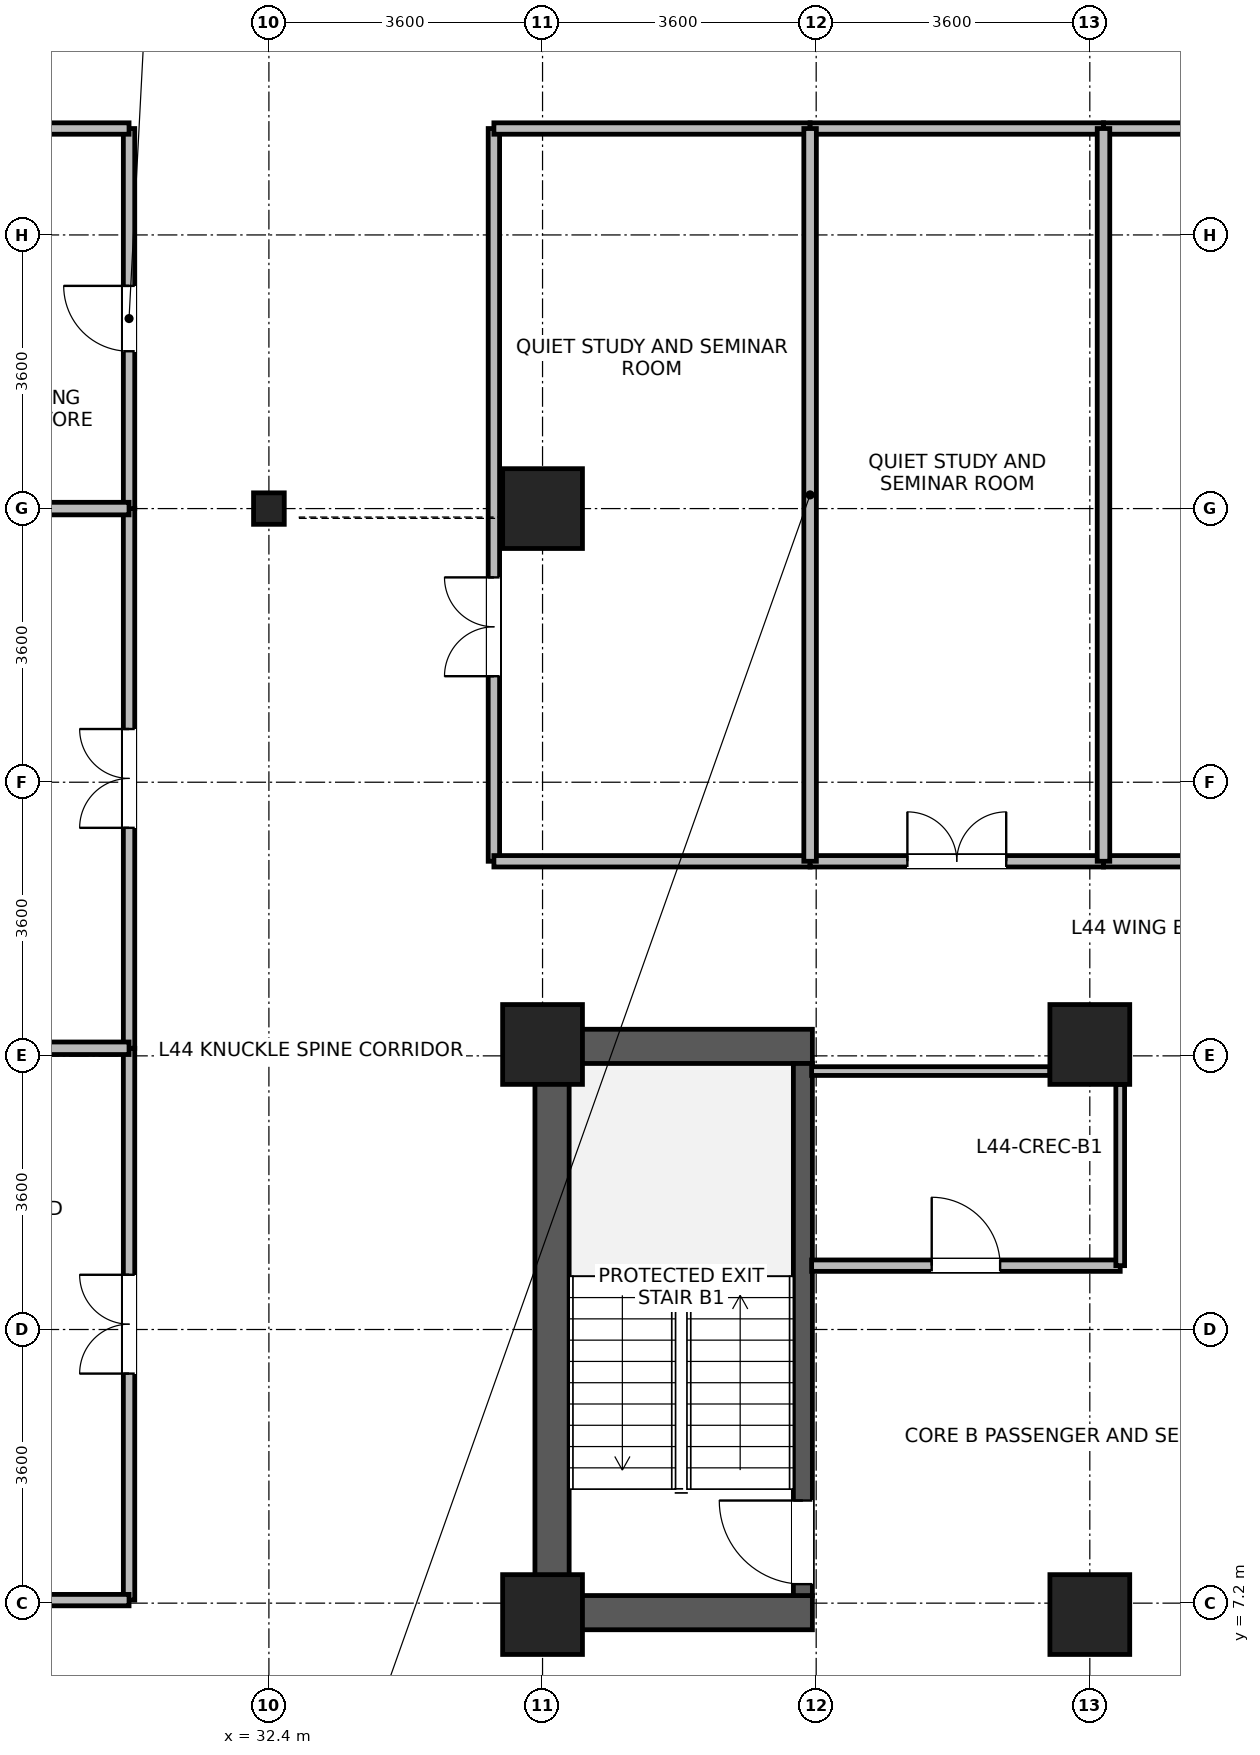
"""IFC4 building model, lengths in metres.
Left out: names, types, materials, properties, quantities, classifications, styles, units other than length and angle.
Written with IfcOpenShell. Run it as: python <this file> out.ifc"""

import sys

from ifc_helpers import new_model, si_unit, direction, frame, frame_2d, origin, origin_2d, place, context, subcontext, project, spatial, rectangle, i_section, extrude, source, transform, mapped, element, fill, save


model = new_model("IFC4")
c1 = context("Model", 3, precision=1e-05, world=origin(), true_north=direction((0.0, 1.0)))
c2 = subcontext(c1, "Body", "Model", "MODEL_VIEW")
j1 = project(units=[si_unit("LENGTHUNIT", "METRE"), si_unit("PLANEANGLEUNIT", "RADIAN")], contexts=[c1])
p1 = place(None, origin())
s1 = spatial("IfcSite", under=j1, at=p1, CompositionType="ELEMENT")
p2 = place(p1, origin())
s2 = spatial("IfcBuilding", under=s1, at=p2, CompositionType="ELEMENT")
p3 = place(p2, frame((0.0, 0.0, 173.5)))
s3 = spatial("IfcBuildingStorey", under=s2, at=p3, CompositionType="ELEMENT", Elevation=173.5)
p4 = place(p3, frame((36.125, 6.85, 0.0), z_axis=(0.0, 0.0, 1.0), x_axis=(0.0, 1.0, 0.0)))
e1 = element("IfcWall", 1, at=p4, inside=s3, PredefinedType="SHEAR", context=c2, shape_type="SweptSolid", body=[
    extrude(rectangle(XDim=7.9, YDim=0.45, at=frame_2d((3.95, 0.0))), origin(), (0.0, 0.0, 1.0), 3.46),
])
for number, where, z_axis, x_axis in (
    (2, (36.35, 7.075, 0.0), (0.0, 0.0, 1.0), (1.0, 0.0, 0.0)),
    (3, (36.35, 14.525, 0.0), (0.0, 0.0, 1.0), (1.0, 0.0, 0.0)),
):
    element("IfcWall", number, at=place(p3, frame(where, z_axis=z_axis, x_axis=x_axis)), inside=s3, PredefinedType="SHEAR", context=c2, shape_type="SweptSolid", body=[
        extrude(rectangle(XDim=3.2, YDim=0.45, at=frame_2d((1.6, 0.0))), origin(), (0.0, 0.0, 1.0), 3.46),
    ])
p5 = place(p3, frame((39.425, 7.3, 0.0), z_axis=(0.0, 0.0, 1.0), x_axis=(0.0, 1.0, 0.0)))
e4 = element("IfcWall", 4, at=p5, inside=s3, PredefinedType="SHEAR", context=c2, shape_type="SweptSolid", body=[
    extrude(rectangle(XDim=7.0, YDim=0.25, at=frame_2d((3.5, 0.0))), origin(), (0.0, 0.0, 1.0), 3.46),
])
p6 = place(p5, frame((0.15, 0.0, 0.0)))
e5 = element("IfcOpeningElement", 5, at=p6, cuts=e4, PredefinedType="OPENING", context=c2, shape_type="SweptSolid", body=[
    extrude(rectangle(XDim=1.1, YDim=2.08, at=frame_2d((0.55, 1.04))), frame((0.0, 0.135, 0.0), z_axis=(0.0, -1.0, 0.0), x_axis=(1.0, 0.0, 0.0)), (0.0, 0.0, 1.0), 0.27),
])
m1 = source(origin(), c2, "Body", "SweptSolid", [
    extrude(rectangle(XDim=1.05, YDim=1.05, at=origin_2d()), origin(), (0.0, 0.0, 1.0), 3.7),
])
for number, where, z_axis, x_axis in (
    (6, (36.0, 21.6, 0.0), (0.0, 0.0, 1.0), (1.0, 0.0, 0.0)),
    (7, (36.0, 7.05, 0.0), (0.0, 0.0, 1.0), (1.0, 0.0, 0.0)),
    (8, (36.0, 14.55, 0.0), (0.0, 0.0, 1.0), (1.0, 0.0, 0.0)),
    (9, (43.2, 7.05, 0.0), (0.0, 0.0, 1.0), (1.0, 0.0, 0.0)),
    (10, (43.2, 14.55, 0.0), (0.0, 0.0, 1.0), (1.0, 0.0, 0.0)),
):
    element("IfcColumn", number, at=place(p3, frame(where, z_axis=z_axis, x_axis=x_axis)), inside=s3, PredefinedType="COLUMN", context=c2, shape_type="MappedRepresentation", body=[
        mapped(m1, transform((0.0, 0.0, 0.0), x_axis=(1.0, 0.0, 0.0), y_axis=(0.0, 1.0, 0.0), z_axis=(0.0, 0.0, 1.0), scale=1.0)),
    ])
m2 = source(origin(), c2, "Body", "SweptSolid", [
    extrude(i_section(OverallWidth=0.404, OverallDepth=0.414, WebThickness=0.021, FlangeThickness=0.028, FilletRadius=0.015, at=origin_2d()), origin(), (0.0, 0.0, 1.0), 3.7),
])
p7 = place(p3, frame((32.4, 21.6, 0.0), z_axis=(0.0, 0.0, 1.0), x_axis=(1.0, 0.0, 0.0)))
e11 = element("IfcColumn", 11, at=p7, inside=s3, PredefinedType="COLUMN", context=c2, shape_type="MappedRepresentation", body=[
    mapped(m2, transform((0.0, 0.0, 0.0), x_axis=(1.0, 0.0, 0.0), y_axis=(0.0, 1.0, 0.0), z_axis=(0.0, 0.0, 1.0), scale=1.0)),
])
p8 = place(p3, frame((35.36, 16.96, 0.0), z_axis=(0.0, 0.0, 1.0), x_axis=(0.0, 1.0, 0.0)))
e12 = element("IfcWall", 12, at=p8, inside=s3, PredefinedType="PARTITIONING", context=c2, shape_type="SweptSolid", body=[
    extrude(rectangle(XDim=9.64, YDim=0.15, at=frame_2d((4.82, 0.0))), origin(), (0.0, 0.0, 1.0), 3.44),
])
p9 = place(p8, frame((2.435, 0.0, 0.0)))
e13 = element("IfcOpeningElement", 13, at=p9, cuts=e12, PredefinedType="OPENING", context=c2, shape_type="SweptSolid", body=[
    extrude(rectangle(XDim=1.3, YDim=2.12, at=frame_2d((0.65, 1.06))), frame((0.0, 0.085, 0.0), z_axis=(0.0, -1.0, 0.0), x_axis=(1.0, 0.0, 0.0)), (0.0, 0.0, 1.0), 0.17),
])
p10 = place(p3, frame((30.56, 7.24, 0.0), z_axis=(0.0, 0.0, 1.0), x_axis=(0.0, 1.0, 0.0)))
e14 = element("IfcWall", 14, at=p10, inside=s3, PredefinedType="PARTITIONING", context=c2, shape_type="SweptSolid", body=[
    extrude(rectangle(XDim=7.26, YDim=0.15, at=frame_2d((3.63, 0.0))), origin(), (0.0, 0.0, 1.0), 3.44),
])
p11 = place(p10, frame((2.98, 0.0, 0.0)))
e15 = element("IfcOpeningElement", 15, at=p11, cuts=e14, PredefinedType="OPENING", context=c2, shape_type="SweptSolid", body=[
    extrude(rectangle(XDim=1.3, YDim=2.12, at=frame_2d((0.65, 1.06))), frame((0.0, 0.085, 0.0), z_axis=(0.0, -1.0, 0.0), x_axis=(1.0, 0.0, 0.0)), (0.0, 0.0, 1.0), 0.17),
])
p12 = place(p3, frame((30.56, 14.5, 0.0), z_axis=(0.0, 0.0, 1.0), x_axis=(0.0, 1.0, 0.0)))
e16 = element("IfcWall", 16, at=p12, inside=s3, PredefinedType="PARTITIONING", context=c2, shape_type="SweptSolid", body=[
    extrude(rectangle(XDim=7.1, YDim=0.15, at=frame_2d((3.55, 0.0))), origin(), (0.0, 0.0, 1.0), 3.44),
])
p13 = place(p12, frame((2.9, 0.0, 0.0)))
e17 = element("IfcOpeningElement", 17, at=p13, cuts=e16, PredefinedType="OPENING", context=c2, shape_type="SweptSolid", body=[
    extrude(rectangle(XDim=1.3, YDim=2.12, at=frame_2d((0.65, 1.06))), frame((0.0, 0.085, 0.0), z_axis=(0.0, -1.0, 0.0), x_axis=(1.0, 0.0, 0.0)), (0.0, 0.0, 1.0), 0.17),
])
p14 = place(p3, frame((43.38, 16.96, 0.0), z_axis=(0.0, 0.0, 1.0), x_axis=(1.0, 0.0, 0.0)))
e18 = element("IfcWall", 18, at=p14, inside=s3, PredefinedType="PARTITIONING", context=c2, shape_type="SweptSolid", body=[
    extrude(rectangle(XDim=5.72, YDim=0.15, at=frame_2d((2.86, 0.0))), origin(), (0.0, 0.0, 1.0), 3.44),
])
p15 = place(p14, frame((2.21, 0.0, 0.0)))
e19 = element("IfcOpeningElement", 19, at=p15, cuts=e18, PredefinedType="OPENING", context=c2, shape_type="SweptSolid", body=[
    extrude(rectangle(XDim=1.3, YDim=2.12, at=frame_2d((0.65, 1.06))), frame((0.0, 0.085, 0.0), z_axis=(0.0, -1.0, 0.0), x_axis=(1.0, 0.0, 0.0)), (0.0, 0.0, 1.0), 0.17),
])
p16 = place(p3, frame((43.38, 26.6, 0.0), z_axis=(0.0, 0.0, 1.0), x_axis=(1.0, 0.0, 0.0)))
e20 = element("IfcWall", 20, at=p16, inside=s3, PredefinedType="PARTITIONING", context=c2, shape_type="SweptSolid", body=[
    extrude(rectangle(XDim=5.72, YDim=0.15, at=frame_2d((2.86, 0.0))), origin(), (0.0, 0.0, 1.0), 3.44),
])
p17 = place(p3, frame((30.56, 21.6, 0.0), z_axis=(0.0, 0.0, 1.0), x_axis=(0.0, 1.0, 0.0)))
e21 = element("IfcWall", 21, at=p17, inside=s3, PredefinedType="PARTITIONING", context=c2, shape_type="SweptSolid", body=[
    extrude(rectangle(XDim=5.0, YDim=0.15, at=frame_2d((2.5, 0.0))), origin(), (0.0, 0.0, 1.0), 3.44),
])
p18 = place(p17, frame((2.07, 0.0, 0.0)))
e22 = element("IfcOpeningElement", 22, at=p18, cuts=e21, PredefinedType="OPENING", context=c2, shape_type="SweptSolid", body=[
    extrude(rectangle(XDim=0.86, YDim=2.02, at=frame_2d((0.43, 1.01))), frame((0.0, 0.085, 0.0), z_axis=(0.0, -1.0, 0.0), x_axis=(1.0, 0.0, 0.0)), (0.0, 0.0, 1.0), 0.17),
])
p19 = place(p3, frame((25.832, 7.24, 0.0), z_axis=(0.0, 0.0, 1.0), x_axis=(1.0, 0.0, 0.0)))
e23 = element("IfcWall", 23, at=p19, inside=s3, PredefinedType="PARTITIONING", context=c2, shape_type="SweptSolid", body=[
    extrude(rectangle(XDim=4.728, YDim=0.15, at=frame_2d((2.364, 0.0))), origin(), (0.0, 0.0, 1.0), 3.44),
])
for number, where, z_axis, x_axis in (
    (24, (35.36, 16.96, 0.0), (0.0, 0.0, 1.0), (1.0, 0.0, 0.0)),
    (25, (35.36, 26.6, 0.0), (0.0, 0.0, 1.0), (1.0, 0.0, 0.0)),
):
    element("IfcWall", number, at=place(p3, frame(where, z_axis=z_axis, x_axis=x_axis)), inside=s3, PredefinedType="PARTITIONING", context=c2, shape_type="SweptSolid", body=[
        extrude(rectangle(XDim=4.16, YDim=0.15, at=frame_2d((2.08, 0.0))), origin(), (0.0, 0.0, 1.0), 3.44),
    ])
p20 = place(p3, frame((39.54, 11.64, 0.0), z_axis=(0.0, 0.0, 1.0), x_axis=(1.0, 0.0, 0.0)))
e26 = element("IfcWall", 26, at=p20, inside=s3, PredefinedType="PARTITIONING", context=c2, shape_type="SweptSolid", body=[
    extrude(rectangle(XDim=4.06, YDim=0.15, at=frame_2d((2.03, 0.0))), origin(), (0.0, 0.0, 1.0), 3.44),
])
p21 = place(p20, frame((1.58, 0.0, 0.0)))
e27 = element("IfcOpeningElement", 27, at=p21, cuts=e26, PredefinedType="OPENING", context=c2, shape_type="SweptSolid", body=[
    extrude(rectangle(XDim=0.9, YDim=2.08, at=frame_2d((0.45, 1.04))), frame((0.0, 0.085, 0.0), z_axis=(0.0, -1.0, 0.0), x_axis=(1.0, 0.0, 0.0)), (0.0, 0.0, 1.0), 0.17),
])
p22 = place(p3, frame((39.52, 16.96, 0.0), z_axis=(0.0, 0.0, 1.0), x_axis=(1.0, 0.0, 0.0)))
e28 = element("IfcWall", 28, at=p22, inside=s3, PredefinedType="PARTITIONING", context=c2, shape_type="SweptSolid", body=[
    extrude(rectangle(XDim=3.86, YDim=0.15, at=frame_2d((1.93, 0.0))), origin(), (0.0, 0.0, 1.0), 3.44),
])
p23 = place(p22, frame((1.28, 0.0, 0.0)))
e29 = element("IfcOpeningElement", 29, at=p23, cuts=e28, PredefinedType="OPENING", context=c2, shape_type="SweptSolid", body=[
    extrude(rectangle(XDim=1.3, YDim=2.12, at=frame_2d((0.65, 1.06))), frame((0.0, 0.085, 0.0), z_axis=(0.0, -1.0, 0.0), x_axis=(1.0, 0.0, 0.0)), (0.0, 0.0, 1.0), 0.17),
])
p24 = place(p3, frame((39.52, 26.6, 0.0), z_axis=(0.0, 0.0, 1.0), x_axis=(1.0, 0.0, 0.0)))
e30 = element("IfcWall", 30, at=p24, inside=s3, PredefinedType="PARTITIONING", context=c2, shape_type="SweptSolid", body=[
    extrude(rectangle(XDim=3.86, YDim=0.15, at=frame_2d((1.93, 0.0))), origin(), (0.0, 0.0, 1.0), 3.44),
])
p25 = place(p3, frame((27.64, 26.6, 0.0), z_axis=(0.0, 0.0, 1.0), x_axis=(1.0, 0.0, 0.0)))
e31 = element("IfcWall", 31, at=p25, inside=s3, PredefinedType="PARTITIONING", context=c2, shape_type="SweptSolid", body=[
    extrude(rectangle(XDim=2.92, YDim=0.15, at=frame_2d((1.46, 0.0))), origin(), (0.0, 0.0, 1.0), 3.44),
])
for number, where, z_axis, x_axis in (
    (32, (39.52, 16.96, 0.0), (0.0, 0.0, 1.0), (0.0, 1.0, 0.0)),
    (33, (43.38, 16.96, 0.0), (0.0, 0.0, 1.0), (0.0, 1.0, 0.0)),
):
    element("IfcWall", number, at=place(p3, frame(where, z_axis=z_axis, x_axis=x_axis)), inside=s3, PredefinedType="PARTITIONING", context=c2, shape_type="SweptSolid", body=[
        extrude(rectangle(XDim=9.64, YDim=0.165, at=frame_2d((4.82, 0.0))), origin(), (0.0, 0.0, 1.0), 3.44),
    ])
p26 = place(p3, frame((25.832, 14.5, 0.0), z_axis=(0.0, 0.0, 1.0), x_axis=(1.0, 0.0, 0.0)))
e34 = element("IfcWall", 34, at=p26, inside=s3, PredefinedType="PARTITIONING", context=c2, shape_type="SweptSolid", body=[
    extrude(rectangle(XDim=4.728, YDim=0.165, at=frame_2d((2.364, 0.0))), origin(), (0.0, 0.0, 1.0), 3.44),
])
p27 = place(p3, frame((39.54, 14.2, 0.0), z_axis=(0.0, 0.0, 1.0), x_axis=(1.0, 0.0, 0.0)))
e35 = element("IfcWall", 35, at=p27, inside=s3, PredefinedType="PARTITIONING", context=c2, shape_type="SweptSolid", body=[
    extrude(rectangle(XDim=3.135, YDim=0.115, at=frame_2d((1.567, 0.0))), origin(), (0.0, 0.0, 1.0), 2.44),
])
p28 = place(p3, frame((27.64, 21.6, 0.0), z_axis=(0.0, 0.0, 1.0), x_axis=(1.0, 0.0, 0.0)))
e36 = element("IfcWall", 36, at=p28, inside=s3, PredefinedType="PARTITIONING", context=c2, shape_type="SweptSolid", body=[
    extrude(rectangle(XDim=2.92, YDim=0.165, at=frame_2d((1.46, 0.0))), origin(), (0.0, 0.0, 1.0), 2.99),
])
p29 = place(p3, frame((43.6, 11.64, 0.0), z_axis=(0.0, 0.0, 1.0), x_axis=(0.0, 1.0, 0.0)))
e37 = element("IfcWall", 37, at=p29, inside=s3, PredefinedType="PARTITIONING", context=c2, shape_type="SweptSolid", body=[
    extrude(rectangle(XDim=2.385, YDim=0.115, at=frame_2d((1.192, 0.0))), origin(), (0.0, 0.0, 1.0), 3.44),
])
p30 = place(p6, origin())
e38 = element("IfcDoor", 38, at=p30, inside=s3, OperationType="SINGLE_SWING_RIGHT", PredefinedType="DOOR", context=c2, shape_type="SweptSolid", body=[
    extrude(rectangle(XDim=1.1, YDim=2.08, at=frame_2d((0.55, 1.04))), frame((0.0, 0.025, 0.0), z_axis=(0.0, -1.0, 0.0), x_axis=(1.0, 0.0, 0.0)), (0.0, 0.0, 1.0), 0.05),
])
fill(e5, e38)
p31 = place(p9, origin())
e39 = element("IfcDoor", 39, at=p31, inside=s3, OperationType="DOUBLE_DOOR_SINGLE_SWING", PredefinedType="DOOR", context=c2, shape_type="SweptSolid", body=[
    extrude(rectangle(XDim=1.3, YDim=2.12, at=frame_2d((0.65, 1.06))), frame((0.0, 0.025, 0.0), z_axis=(0.0, -1.0, 0.0), x_axis=(1.0, 0.0, 0.0)), (0.0, 0.0, 1.0), 0.05),
])
fill(e13, e39)
p32 = place(p11, origin())
e40 = element("IfcDoor", 40, at=p32, inside=s3, OperationType="DOUBLE_DOOR_SINGLE_SWING", PredefinedType="DOOR", context=c2, shape_type="SweptSolid", body=[
    extrude(rectangle(XDim=1.3, YDim=2.12, at=frame_2d((0.65, 1.06))), frame((0.0, 0.025, 0.0), z_axis=(0.0, -1.0, 0.0), x_axis=(1.0, 0.0, 0.0)), (0.0, 0.0, 1.0), 0.05),
])
fill(e15, e40)
p33 = place(p13, origin())
e41 = element("IfcDoor", 41, at=p33, inside=s3, OperationType="DOUBLE_DOOR_SINGLE_SWING", PredefinedType="DOOR", context=c2, shape_type="SweptSolid", body=[
    extrude(rectangle(XDim=1.3, YDim=2.12, at=frame_2d((0.65, 1.06))), frame((0.0, 0.025, 0.0), z_axis=(0.0, -1.0, 0.0), x_axis=(1.0, 0.0, 0.0)), (0.0, 0.0, 1.0), 0.05),
])
fill(e17, e41)
p34 = place(p18, origin())
e42 = element("IfcDoor", 42, at=p34, inside=s3, OperationType="SINGLE_SWING_RIGHT", PredefinedType="DOOR", context=c2, shape_type="SweptSolid", body=[
    extrude(rectangle(XDim=0.86, YDim=2.02, at=frame_2d((0.43, 1.01))), frame((0.0, 0.025, 0.0), z_axis=(0.0, -1.0, 0.0), x_axis=(1.0, 0.0, 0.0)), (0.0, 0.0, 1.0), 0.05),
])
fill(e22, e42)
p35 = place(p21, origin())
e43 = element("IfcDoor", 43, at=p35, inside=s3, OperationType="SINGLE_SWING_LEFT", PredefinedType="DOOR", context=c2, shape_type="SweptSolid", body=[
    extrude(rectangle(XDim=0.9, YDim=2.08, at=frame_2d((0.45, 1.04))), frame((0.0, 0.025, 0.0), z_axis=(0.0, -1.0, 0.0), x_axis=(1.0, 0.0, 0.0)), (0.0, 0.0, 1.0), 0.05),
])
fill(e27, e43)
p36 = place(p23, origin())
e44 = element("IfcDoor", 44, at=p36, inside=s3, OperationType="DOUBLE_DOOR_SINGLE_SWING", PredefinedType="DOOR", context=c2, shape_type="SweptSolid", body=[
    extrude(rectangle(XDim=1.3, YDim=2.12, at=frame_2d((0.65, 1.06))), frame((0.0, 0.025, 0.0), z_axis=(0.0, -1.0, 0.0), x_axis=(1.0, 0.0, 0.0)), (0.0, 0.0, 1.0), 0.05),
])
fill(e29, e44)
save(model, sys.argv[1])
